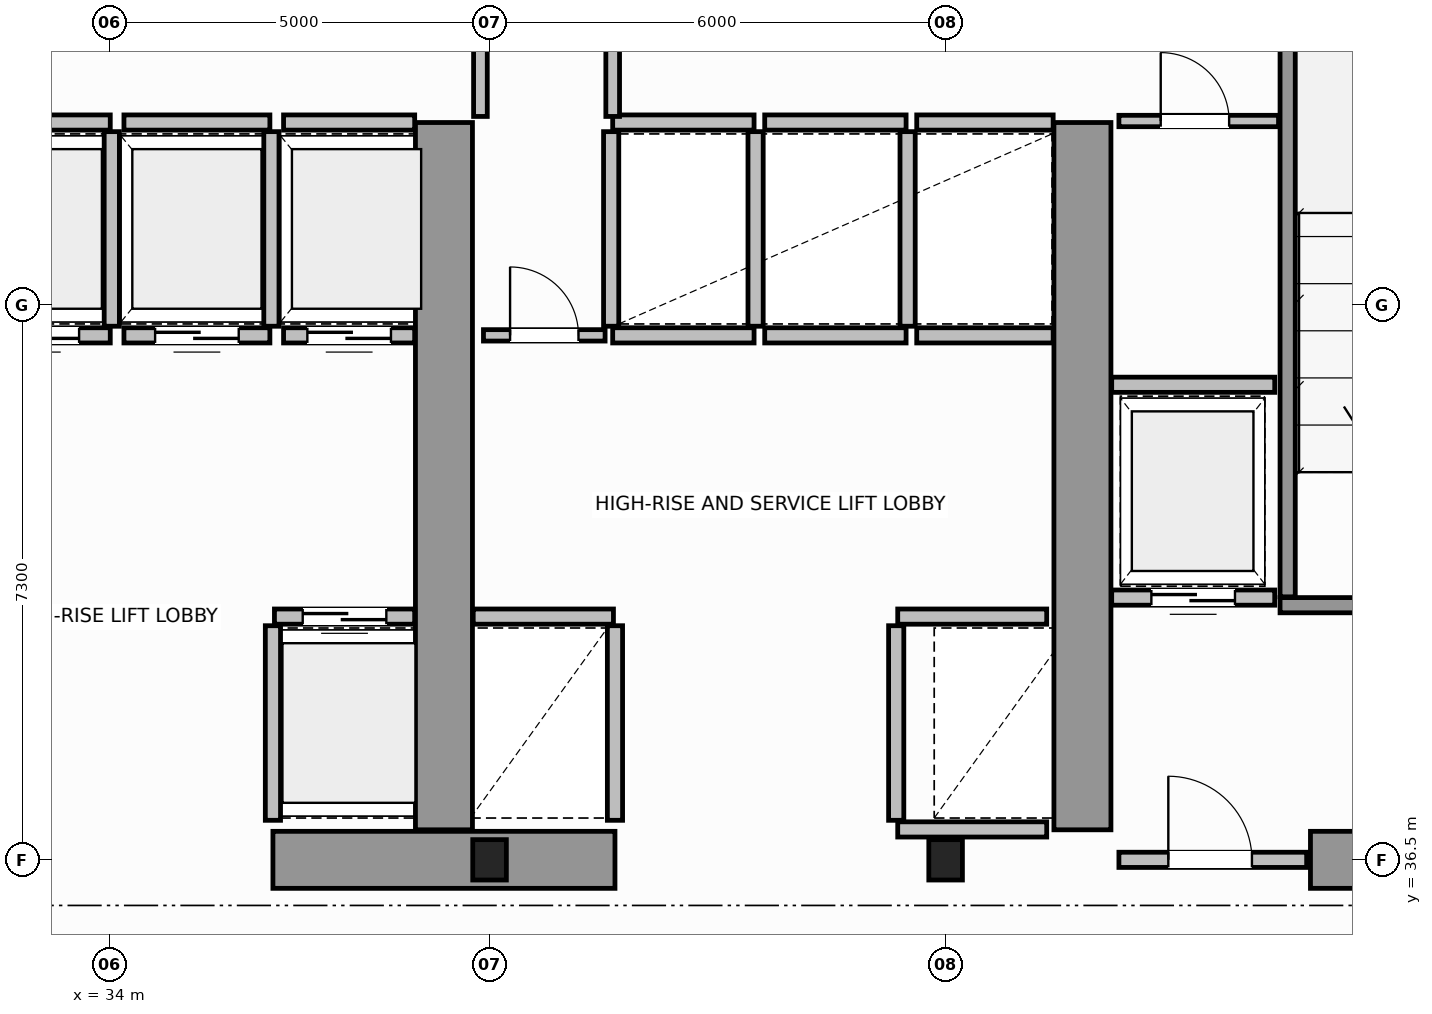
"""IFC4 building model, lengths in metres.
Left out: names, types, materials, properties, quantities, classifications, styles, units other than length and angle.
Written with IfcOpenShell. Run it as: python <this file> out.ifc"""

import sys

from ifc_helpers import new_model, si_unit, direction, frame, frame_2d, origin, origin_2d, place, context, subcontext, project, spatial, rectangle, i_section, extrude, source, transform, mapped, element, fill, save


model = new_model("IFC4")
c1 = context("Model", 3, precision=1e-05, world=origin(), true_north=direction((0.0, 1.0)))
c2 = subcontext(c1, "Body", "Model", "MODEL_VIEW")
j1 = project(units=[si_unit("LENGTHUNIT", "METRE"), si_unit("PLANEANGLEUNIT", "RADIAN")], contexts=[c1])
p1 = place(None, origin())
s1 = spatial("IfcSite", under=j1, at=p1, CompositionType="ELEMENT")
p2 = place(p1, origin())
s2 = spatial("IfcBuilding", under=s1, at=p2, CompositionType="ELEMENT")
p3 = place(p2, frame((0.0, 0.0, 137.6)))
s3 = spatial("IfcBuildingStorey", under=s2, at=p3, CompositionType="ELEMENT", Elevation=137.6)
m1 = source(origin(), c2, "Body", "SweptSolid", [
    extrude(i_section(OverallWidth=0.442, OverallDepth=0.531, WebThickness=0.065, FlangeThickness=0.076, FilletRadius=0.015, at=origin_2d()), origin(), (0.0, 0.0, 1.0), 3.8),
])
for number, where, z_axis, x_axis in (
    (1, (39.0, 36.5, 0.0), (0.0, 0.0, 1.0), (1.0, 0.0, 0.0)),
    (2, (45.0, 36.5, 0.0), (0.0, 0.0, 1.0), (1.0, 0.0, 0.0)),
):
    element("IfcColumn", number, at=place(p3, frame(where, z_axis=z_axis, x_axis=x_axis)), inside=s3, PredefinedType="COLUMN", context=c2, shape_type="MappedRepresentation", body=[
        mapped(m1, transform((0.0, 0.0, 0.0), scale=1.0)),
    ])
p4 = place(p3, frame((36.15, 36.5, 0.0), z_axis=(0.0, 0.0, 1.0), x_axis=(1.0, 0.0, 0.0)))
e3 = element("IfcWall", 3, at=p4, inside=s3, PredefinedType="SHEAR", context=c2, shape_type="SweptSolid", body=[
    extrude(rectangle(XDim=4.5, YDim=0.75, at=frame_2d((2.25, 0.0))), origin(), (0.0, 0.0, 1.0), 3.8),
])
p5 = place(p3, frame((49.8, 36.5, 0.0), z_axis=(0.0, 0.0, 1.0), x_axis=(1.0, 0.0, 0.0)))
e4 = element("IfcWall", 4, at=p5, inside=s3, PredefinedType="SHEAR", context=c2, shape_type="SweptSolid", body=[
    extrude(rectangle(XDim=3.805, YDim=0.75, at=frame_2d((1.902, 0.0))), origin(), (0.0, 0.0, 1.0), 2.38),
])
for number, where, z_axis, x_axis in (
    (5, (38.4, 36.895, 0.0), (0.0, 0.0, 1.0), (0.0, 1.0, 0.0)),
    (6, (46.8, 36.895, 0.0), (0.0, 0.0, 1.0), (0.0, 1.0, 0.0)),
):
    element("IfcWall", number, at=place(p3, frame(where, z_axis=z_axis, x_axis=x_axis)), inside=s3, PredefinedType="SHEAR", context=c2, shape_type="SweptSolid", body=[
        extrude(rectangle(XDim=9.305, YDim=0.75, at=frame_2d((4.652, 0.0))), origin(), (0.0, 0.0, 1.0), 3.8),
    ])
p6 = place(p3, frame((49.4, 39.85, 0.0), z_axis=(0.0, 0.0, 1.0), x_axis=(1.0, 0.0, 0.0)))
e7 = element("IfcWall", 7, at=p6, inside=s3, PredefinedType="SOLIDWALL", context=c2, shape_type="SweptSolid", body=[
    extrude(rectangle(XDim=4.225, YDim=0.2, at=frame_2d((2.113, 0.0))), origin(), (0.0, 0.0, 1.0), 3.8),
])
p7 = place(p6, frame((1.325, 0.0, 0.0)))
e8 = element("IfcOpeningElement", 8, at=p7, cuts=e7, PredefinedType="OPENING", context=c2, shape_type="SweptSolid", body=[
    extrude(rectangle(XDim=1.1, YDim=2.15, at=frame_2d((0.55, 1.075))), frame((0.0, 0.11, 0.0), z_axis=(0.0, -1.0, 0.0), x_axis=(1.0, 0.0, 0.0)), (0.0, 0.0, 1.0), 0.22),
])
p8 = place(p3, frame((49.5, 39.96, 0.0), z_axis=(0.0, 0.0, 1.0), x_axis=(0.0, 1.0, 0.0)))
e9 = element("IfcWall", 9, at=p8, inside=s3, PredefinedType="SOLIDWALL", context=c2, shape_type="SweptSolid", body=[
    extrude(rectangle(XDim=9.93, YDim=0.2, at=frame_2d((4.965, 0.0))), origin(), (0.0, 0.0, 1.0), 3.8),
])
p9 = place(p3, frame((47.28, 36.5, 0.0), z_axis=(0.0, 0.0, 1.0), x_axis=(1.0, 0.0, 0.0)))
e10 = element("IfcWall", 10, at=p9, inside=s3, PredefinedType="SOLIDWALL", context=c2, shape_type="SweptSolid", body=[
    extrude(rectangle(XDim=2.47, YDim=0.2, at=frame_2d((1.235, 0.0))), origin(), (0.0, 0.0, 1.0), 2.37),
])
p10 = place(p9, frame((0.65, 0.0, 0.0)))
e11 = element("IfcOpeningElement", 11, at=p10, cuts=e10, PredefinedType="OPENING", context=c2, shape_type="SweptSolid", body=[
    extrude(rectangle(XDim=1.1, YDim=2.15, at=frame_2d((0.55, 1.075))), frame((0.0, 0.11, 0.0), z_axis=(0.0, -1.0, 0.0), x_axis=(1.0, 0.0, 0.0)), (0.0, 0.0, 1.0), 0.22),
])
p11 = place(p3, frame((36.17, 39.7, 0.0), z_axis=(0.0, 0.0, 1.0), x_axis=(1.0, 0.0, 0.0)))
e12 = element("IfcWall", 12, at=p11, inside=s3, PredefinedType="SOLIDWALL", context=c2, shape_type="SweptSolid", body=[
    extrude(rectangle(XDim=1.845, YDim=0.2, at=frame_2d((0.922, 0.0))), origin(), (0.0, 0.0, 1.0), 3.58),
])
p12 = place(p11, frame((0.372, 0.0, 0.0)))
e13 = element("IfcOpeningElement", 13, at=p12, cuts=e12, PredefinedType="OPENING", context=c2, shape_type="SweptSolid", body=[
    extrude(rectangle(XDim=1.1, YDim=2.15, at=frame_2d((0.55, 1.075))), frame((0.0, 0.11, 0.0), z_axis=(0.0, -1.0, 0.0), x_axis=(1.0, 0.0, 0.0)), (0.0, 0.0, 1.0), 0.22),
])
p13 = place(p3, frame((36.15, 37.02, 0.0), z_axis=(0.0, 0.0, 1.0), x_axis=(0.0, 1.0, 0.0)))
e14 = element("IfcWall", 14, at=p13, inside=s3, PredefinedType="SOLIDWALL", context=c2, shape_type="SweptSolid", body=[
    extrude(rectangle(XDim=2.56, YDim=0.2, at=frame_2d((1.28, 0.0))), origin(), (0.0, 0.0, 1.0), 3.58),
])
p14 = place(p3, frame((32.09, 43.4, 0.0), z_axis=(0.0, 0.0, 1.0), x_axis=(1.0, 0.0, 0.0)))
e15 = element("IfcWall", 15, at=p14, inside=s3, PredefinedType="SOLIDWALL", context=c2, shape_type="SweptSolid", body=[
    extrude(rectangle(XDim=1.92, YDim=0.2, at=frame_2d((0.96, 0.0))), origin(), (0.0, 0.0, 1.0), 3.58),
])
p15 = place(p14, frame((0.41, 0.0, 0.0)))
e16 = element("IfcOpeningElement", 16, at=p15, cuts=e15, PredefinedType="OPENING", context=c2, shape_type="SweptSolid", body=[
    extrude(rectangle(XDim=1.1, YDim=2.15, at=frame_2d((0.55, 1.075))), frame((0.0, 0.11, 0.0), z_axis=(0.0, -1.0, 0.0), x_axis=(1.0, 0.0, 0.0)), (0.0, 0.0, 1.0), 0.22),
])
p16 = place(p3, frame((32.09, 46.2, 0.0), z_axis=(0.0, 0.0, 1.0), x_axis=(1.0, 0.0, 0.0)))
e17 = element("IfcWall", 17, at=p16, inside=s3, PredefinedType="SOLIDWALL", context=c2, shape_type="SweptSolid", body=[
    extrude(rectangle(XDim=1.92, YDim=0.2, at=frame_2d((0.96, 0.0))), origin(), (0.0, 0.0, 1.0), 3.58),
])
p17 = place(p3, frame((34.03, 43.52, 0.0), z_axis=(0.0, 0.0, 1.0), x_axis=(0.0, 1.0, 0.0)))
e18 = element("IfcWall", 18, at=p17, inside=s3, PredefinedType="SOLIDWALL", context=c2, shape_type="SweptSolid", body=[
    extrude(rectangle(XDim=2.56, YDim=0.2, at=frame_2d((1.28, 0.0))), origin(), (0.0, 0.0, 1.0), 3.58),
])
p18 = place(p3, frame((34.19, 43.4, 0.0), z_axis=(0.0, 0.0, 1.0), x_axis=(1.0, 0.0, 0.0)))
e19 = element("IfcWall", 19, at=p18, inside=s3, PredefinedType="SOLIDWALL", context=c2, shape_type="SweptSolid", body=[
    extrude(rectangle(XDim=1.92, YDim=0.2, at=frame_2d((0.96, 0.0))), origin(), (0.0, 0.0, 1.0), 3.58),
])
p19 = place(p18, frame((0.41, 0.0, 0.0)))
e20 = element("IfcOpeningElement", 20, at=p19, cuts=e19, PredefinedType="OPENING", context=c2, shape_type="SweptSolid", body=[
    extrude(rectangle(XDim=1.1, YDim=2.15, at=frame_2d((0.55, 1.075))), frame((0.0, 0.11, 0.0), z_axis=(0.0, -1.0, 0.0), x_axis=(1.0, 0.0, 0.0)), (0.0, 0.0, 1.0), 0.22),
])
p20 = place(p3, frame((34.19, 46.2, 0.0), z_axis=(0.0, 0.0, 1.0), x_axis=(1.0, 0.0, 0.0)))
e21 = element("IfcWall", 21, at=p20, inside=s3, PredefinedType="SOLIDWALL", context=c2, shape_type="SweptSolid", body=[
    extrude(rectangle(XDim=1.92, YDim=0.2, at=frame_2d((0.96, 0.0))), origin(), (0.0, 0.0, 1.0), 3.58),
])
p21 = place(p3, frame((36.13, 43.52, 0.0), z_axis=(0.0, 0.0, 1.0), x_axis=(0.0, 1.0, 0.0)))
e22 = element("IfcWall", 22, at=p21, inside=s3, PredefinedType="SOLIDWALL", context=c2, shape_type="SweptSolid", body=[
    extrude(rectangle(XDim=2.56, YDim=0.2, at=frame_2d((1.28, 0.0))), origin(), (0.0, 0.0, 1.0), 3.58),
])
p22 = place(p3, frame((36.29, 43.4, 0.0), z_axis=(0.0, 0.0, 1.0), x_axis=(1.0, 0.0, 0.0)))
e23 = element("IfcWall", 23, at=p22, inside=s3, PredefinedType="SOLIDWALL", context=c2, shape_type="SweptSolid", body=[
    extrude(rectangle(XDim=1.725, YDim=0.2, at=frame_2d((0.862, 0.0))), origin(), (0.0, 0.0, 1.0), 3.58),
])
p23 = place(p22, frame((0.313, 0.0, 0.0)))
e24 = element("IfcOpeningElement", 24, at=p23, cuts=e23, PredefinedType="OPENING", context=c2, shape_type="SweptSolid", body=[
    extrude(rectangle(XDim=1.1, YDim=2.15, at=frame_2d((0.55, 1.075))), frame((0.0, 0.11, 0.0), z_axis=(0.0, -1.0, 0.0), x_axis=(1.0, 0.0, 0.0)), (0.0, 0.0, 1.0), 0.22),
])
p24 = place(p3, frame((36.29, 46.2, 0.0), z_axis=(0.0, 0.0, 1.0), x_axis=(1.0, 0.0, 0.0)))
e25 = element("IfcWall", 25, at=p24, inside=s3, PredefinedType="SOLIDWALL", context=c2, shape_type="SweptSolid", body=[
    extrude(rectangle(XDim=1.725, YDim=0.2, at=frame_2d((0.862, 0.0))), origin(), (0.0, 0.0, 1.0), 3.58),
])
p25 = place(p3, frame((38.785, 39.7, 0.0), z_axis=(0.0, 0.0, 1.0), x_axis=(1.0, 0.0, 0.0)))
e26 = element("IfcWall", 26, at=p25, inside=s3, PredefinedType="SOLIDWALL", context=c2, shape_type="SweptSolid", body=[
    extrude(rectangle(XDim=1.845, YDim=0.2, at=frame_2d((0.922, 0.0))), origin(), (0.0, 0.0, 1.0), 3.58),
])
p26 = place(p3, frame((40.65, 37.02, 0.0), z_axis=(0.0, 0.0, 1.0), x_axis=(0.0, 1.0, 0.0)))
e27 = element("IfcWall", 27, at=p26, inside=s3, PredefinedType="SOLIDWALL", context=c2, shape_type="SweptSolid", body=[
    extrude(rectangle(XDim=2.56, YDim=0.2, at=frame_2d((1.28, 0.0))), origin(), (0.0, 0.0, 1.0), 3.58),
])
p27 = place(p3, frame((44.37, 39.7, 0.0), z_axis=(0.0, 0.0, 1.0), x_axis=(1.0, 0.0, 0.0)))
e28 = element("IfcWall", 28, at=p27, inside=s3, PredefinedType="SOLIDWALL", context=c2, shape_type="SweptSolid", body=[
    extrude(rectangle(XDim=1.96, YDim=0.2, at=frame_2d((0.98, 0.0))), origin(), (0.0, 0.0, 1.0), 3.58),
])
p28 = place(p3, frame((44.37, 36.9, 0.0), z_axis=(0.0, 0.0, 1.0), x_axis=(1.0, 0.0, 0.0)))
e29 = element("IfcWall", 29, at=p28, inside=s3, PredefinedType="SOLIDWALL", context=c2, shape_type="SweptSolid", body=[
    extrude(rectangle(XDim=1.96, YDim=0.2, at=frame_2d((0.98, 0.0))), origin(), (0.0, 0.0, 1.0), 2.37),
])
p29 = place(p3, frame((44.35, 37.02, 0.0), z_axis=(0.0, 0.0, 1.0), x_axis=(0.0, 1.0, 0.0)))
e30 = element("IfcWall", 30, at=p29, inside=s3, PredefinedType="SOLIDWALL", context=c2, shape_type="SweptSolid", body=[
    extrude(rectangle(XDim=2.56, YDim=0.2, at=frame_2d((1.28, 0.0))), origin(), (0.0, 0.0, 1.0), 3.58),
])
for number, where, z_axis, x_axis in (
    (31, (40.62, 43.4, 0.0), (0.0, 0.0, 1.0), (1.0, 0.0, 0.0)),
    (32, (40.62, 46.2, 0.0), (0.0, 0.0, 1.0), (1.0, 0.0, 0.0)),
):
    element("IfcWall", number, at=place(p3, frame(where, z_axis=z_axis, x_axis=x_axis)), inside=s3, PredefinedType="SOLIDWALL", context=c2, shape_type="SweptSolid", body=[
        extrude(rectangle(XDim=1.86, YDim=0.2, at=frame_2d((0.93, 0.0))), origin(), (0.0, 0.0, 1.0), 3.58),
    ])
for number, where, z_axis, x_axis in (
    (33, (40.6, 43.52, 0.0), (0.0, 0.0, 1.0), (0.0, 1.0, 0.0)),
    (34, (42.5, 43.52, 0.0), (0.0, 0.0, 1.0), (0.0, 1.0, 0.0)),
):
    element("IfcWall", number, at=place(p3, frame(where, z_axis=z_axis, x_axis=x_axis)), inside=s3, PredefinedType="SOLIDWALL", context=c2, shape_type="SweptSolid", body=[
        extrude(rectangle(XDim=2.56, YDim=0.2, at=frame_2d((1.28, 0.0))), origin(), (0.0, 0.0, 1.0), 3.58),
    ])
for number, where, z_axis, x_axis in (
    (35, (42.62, 43.4, 0.0), (0.0, 0.0, 1.0), (1.0, 0.0, 0.0)),
    (36, (42.62, 46.2, 0.0), (0.0, 0.0, 1.0), (1.0, 0.0, 0.0)),
):
    element("IfcWall", number, at=place(p3, frame(where, z_axis=z_axis, x_axis=x_axis)), inside=s3, PredefinedType="SOLIDWALL", context=c2, shape_type="SweptSolid", body=[
        extrude(rectangle(XDim=1.86, YDim=0.2, at=frame_2d((0.93, 0.0))), origin(), (0.0, 0.0, 1.0), 3.58),
    ])
p30 = place(p3, frame((44.5, 43.52, 0.0), z_axis=(0.0, 0.0, 1.0), x_axis=(0.0, 1.0, 0.0)))
e37 = element("IfcWall", 37, at=p30, inside=s3, PredefinedType="SOLIDWALL", context=c2, shape_type="SweptSolid", body=[
    extrude(rectangle(XDim=2.56, YDim=0.2, at=frame_2d((1.28, 0.0))), origin(), (0.0, 0.0, 1.0), 3.58),
])
for number, where, z_axis, x_axis in (
    (38, (44.62, 43.4, 0.0), (0.0, 0.0, 1.0), (1.0, 0.0, 0.0)),
    (39, (44.62, 46.2, 0.0), (0.0, 0.0, 1.0), (1.0, 0.0, 0.0)),
):
    element("IfcWall", number, at=place(p3, frame(where, z_axis=z_axis, x_axis=x_axis)), inside=s3, PredefinedType="SOLIDWALL", context=c2, shape_type="SweptSolid", body=[
        extrude(rectangle(XDim=1.795, YDim=0.2, at=frame_2d((0.897, 0.0))), origin(), (0.0, 0.0, 1.0), 3.58),
    ])
p31 = place(p3, frame((47.185, 39.95, 0.0), z_axis=(0.0, 0.0, 1.0), x_axis=(1.0, 0.0, 0.0)))
e40 = element("IfcWall", 40, at=p31, inside=s3, PredefinedType="SOLIDWALL", context=c2, shape_type="SweptSolid", body=[
    extrude(rectangle(XDim=2.145, YDim=0.2, at=frame_2d((1.073, 0.0))), origin(), (0.0, 0.0, 1.0), 3.58),
])
p32 = place(p31, frame((0.522, 0.0, 0.0)))
e41 = element("IfcOpeningElement", 41, at=p32, cuts=e40, PredefinedType="OPENING", context=c2, shape_type="SweptSolid", body=[
    extrude(rectangle(XDim=1.1, YDim=2.15, at=frame_2d((0.55, 1.075))), frame((0.0, 0.11, 0.0), z_axis=(0.0, -1.0, 0.0), x_axis=(1.0, 0.0, 0.0)), (0.0, 0.0, 1.0), 0.22),
])
p33 = place(p3, frame((47.185, 42.75, 0.0), z_axis=(0.0, 0.0, 1.0), x_axis=(1.0, 0.0, 0.0)))
e42 = element("IfcWall", 42, at=p33, inside=s3, PredefinedType="SOLIDWALL", context=c2, shape_type="SweptSolid", body=[
    extrude(rectangle(XDim=2.145, YDim=0.2, at=frame_2d((1.073, 0.0))), origin(), (0.0, 0.0, 1.0), 3.58),
])
p34 = place(p3, frame((47.28, 46.22, 0.0), z_axis=(0.0, 0.0, 1.0), x_axis=(1.0, 0.0, 0.0)))
e43 = element("IfcWall", 43, at=p34, inside=s3, PredefinedType="PARTITIONING", context=c2, shape_type="SweptSolid", body=[
    extrude(rectangle(XDim=2.1, YDim=0.15, at=frame_2d((1.05, 0.0))), origin(), (0.0, 0.0, 1.0), 3.58),
])
p35 = place(p34, frame((0.55, 0.0, 0.0)))
e44 = element("IfcOpeningElement", 44, at=p35, cuts=e43, PredefinedType="OPENING", context=c2, shape_type="SweptSolid", body=[
    extrude(rectangle(XDim=0.9, YDim=2.1, at=frame_2d((0.45, 1.05))), frame((0.0, 0.085, 0.0), z_axis=(0.0, -1.0, 0.0), x_axis=(1.0, 0.0, 0.0)), (0.0, 0.0, 1.0), 0.17),
])
p36 = place(p3, frame((38.92, 43.4, 0.0), z_axis=(0.0, 0.0, 1.0), x_axis=(1.0, 0.0, 0.0)))
e45 = element("IfcWall", 45, at=p36, inside=s3, PredefinedType="PARTITIONING", context=c2, shape_type="SweptSolid", body=[
    extrude(rectangle(XDim=1.6, YDim=0.15, at=frame_2d((0.8, 0.0))), origin(), (0.0, 0.0, 1.0), 3.58),
])
p37 = place(p36, frame((0.35, 0.0, 0.0)))
e46 = element("IfcOpeningElement", 46, at=p37, cuts=e45, PredefinedType="OPENING", context=c2, shape_type="SweptSolid", body=[
    extrude(rectangle(XDim=0.9, YDim=2.1, at=frame_2d((0.45, 1.05))), frame((0.0, 0.085, 0.0), z_axis=(0.0, -1.0, 0.0), x_axis=(1.0, 0.0, 0.0)), (0.0, 0.0, 1.0), 0.17),
])
p38 = place(p3, frame((38.88, 46.28, 0.0), z_axis=(0.0, 0.0, 1.0), x_axis=(0.0, 1.0, 0.0)))
e47 = element("IfcWall", 47, at=p38, inside=s3, PredefinedType="PLUMBINGWALL", context=c2, shape_type="SweptSolid", body=[
    extrude(rectangle(XDim=1.94, YDim=0.18, at=frame_2d((0.97, 0.0))), origin(), (0.0, 0.0, 1.0), 3.58),
])
p39 = place(p3, frame((40.62, 46.28, 0.0), z_axis=(0.0, 0.0, 1.0), x_axis=(0.0, 1.0, 0.0)))
e48 = element("IfcWall", 48, at=p39, inside=s3, PredefinedType="PLUMBINGWALL", context=c2, shape_type="SweptSolid", body=[
    extrude(rectangle(XDim=2.0, YDim=0.18, at=frame_2d((1.0, 0.0))), origin(), (0.0, 0.0, 1.0), 3.58),
])
m2 = source(origin(), c2, "Body", "SweptSolid", [
    extrude(rectangle(XDim=1.1, YDim=2.15, at=frame_2d((0.55, 1.075))), frame((0.0, 0.025, 0.0), z_axis=(0.0, -1.0, 0.0), x_axis=(1.0, 0.0, 0.0)), (0.0, 0.0, 1.0), 0.05),
])
p40 = place(p10, origin())
e49 = element("IfcDoor", 49, at=p40, inside=s3, OperationType="SINGLE_SWING_LEFT", PredefinedType="DOOR", context=c2, shape_type="MappedRepresentation", body=[
    mapped(m2, transform((0.0, 0.0, 0.0), scale=1.0)),
])
fill(e11, e49)
p41 = place(p12, origin())
e50 = element("IfcDoor", 50, at=p41, inside=s3, OperationType="DOUBLE_DOOR_SLIDING", PredefinedType="DOOR", context=c2, shape_type="MappedRepresentation", body=[
    mapped(m2, transform((0.0, 0.0, 0.0), scale=1.0)),
])
fill(e13, e50)
p42 = place(p15, origin())
e51 = element("IfcDoor", 51, at=p42, inside=s3, OperationType="DOUBLE_DOOR_SLIDING", PredefinedType="DOOR", context=c2, shape_type="MappedRepresentation", body=[
    mapped(m2, transform((0.0, 0.0, 0.0), scale=1.0)),
])
fill(e16, e51)
p43 = place(p19, origin())
e52 = element("IfcDoor", 52, at=p43, inside=s3, OperationType="DOUBLE_DOOR_SLIDING", PredefinedType="DOOR", context=c2, shape_type="MappedRepresentation", body=[
    mapped(m2, transform((0.0, 0.0, 0.0), scale=1.0)),
])
fill(e20, e52)
p44 = place(p23, origin())
e53 = element("IfcDoor", 53, at=p44, inside=s3, OperationType="DOUBLE_DOOR_SLIDING", PredefinedType="DOOR", context=c2, shape_type="MappedRepresentation", body=[
    mapped(m2, transform((0.0, 0.0, 0.0), scale=1.0)),
])
fill(e24, e53)
p45 = place(p32, origin())
e54 = element("IfcDoor", 54, at=p45, inside=s3, OperationType="DOUBLE_DOOR_SLIDING", PredefinedType="DOOR", context=c2, shape_type="MappedRepresentation", body=[
    mapped(m2, transform((0.0, 0.0, 0.0), scale=1.0)),
])
fill(e41, e54)
m3 = source(origin(), c2, "Body", "SweptSolid", [
    extrude(rectangle(XDim=0.9, YDim=2.1, at=frame_2d((0.45, 1.05))), frame((0.0, 0.025, 0.0), z_axis=(0.0, -1.0, 0.0), x_axis=(1.0, 0.0, 0.0)), (0.0, 0.0, 1.0), 0.05),
])
p46 = place(p35, origin())
e55 = element("IfcDoor", 55, at=p46, inside=s3, OperationType="SINGLE_SWING_RIGHT", PredefinedType="DOOR", context=c2, shape_type="MappedRepresentation", body=[
    mapped(m3, transform((0.0, 0.0, 0.0), scale=1.0)),
])
fill(e44, e55)
p47 = place(p37, origin())
e56 = element("IfcDoor", 56, at=p47, inside=s3, OperationType="SINGLE_SWING_LEFT", PredefinedType="DOOR", context=c2, shape_type="MappedRepresentation", body=[
    mapped(m3, transform((0.0, 0.0, 0.0), scale=1.0)),
])
fill(e46, e56)
save(model, sys.argv[1])
